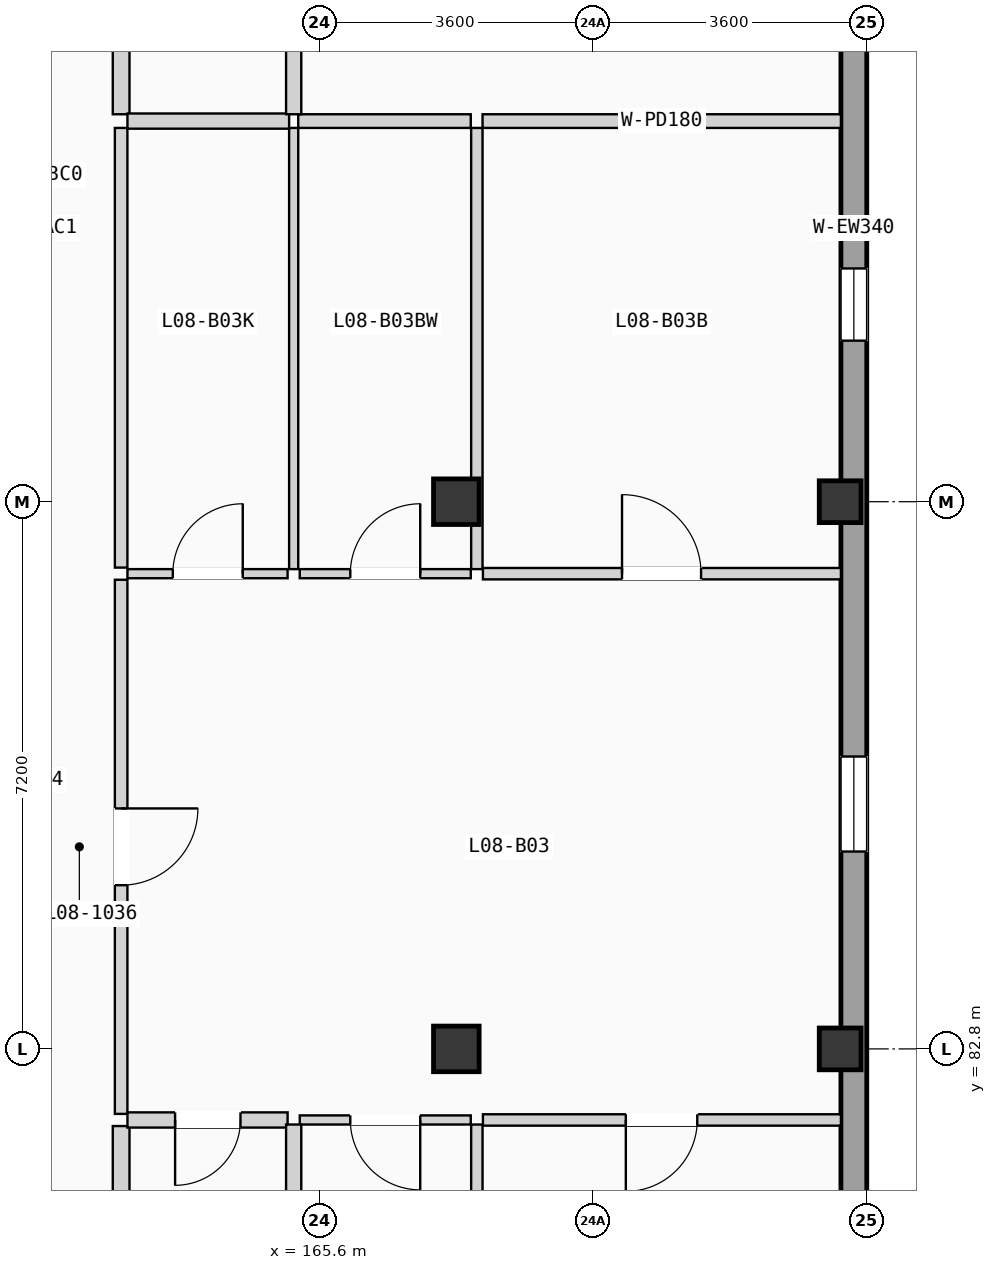
"""IFC4 building model, lengths in metres.
Left out: names, types, materials, properties, quantities, classifications, styles, units other than length and angle.
Written with IfcOpenShell. Run it as: python <this file> out.ifc"""

import sys

from ifc_helpers import new_model, si_unit, direction, frame, frame_2d, origin, origin_2d, place, context, subcontext, project, spatial, rectangle, extrude, element, fill, save


model = new_model("IFC4")
c1 = context("Model", 3, precision=1e-05, world=origin(), true_north=direction((0.0, 1.0)))
c2 = subcontext(c1, "Body", "Model", "MODEL_VIEW")
j1 = project(units=[si_unit("LENGTHUNIT", "METRE"), si_unit("PLANEANGLEUNIT", "RADIAN")], contexts=[c1])
p1 = place(None, origin())
s1 = spatial("IfcSite", under=j1, at=p1, CompositionType="ELEMENT")
p2 = place(p1, origin())
s2 = spatial("IfcBuilding", under=s1, at=p2, CompositionType="ELEMENT")
p3 = place(p2, frame((0.0, 0.0, 27.825)))
s3 = spatial("IfcBuildingStorey", under=s2, at=p3, CompositionType="ELEMENT", Elevation=27.825)
for number, where, z_axis, x_axis in (
    (1, (167.4, 82.8, 0.0), (0.0, 0.0, 1.0), (1.0, 0.0, 0.0)),
    (2, (167.4, 90.0, 0.0), (0.0, 0.0, 1.0), (1.0, 0.0, 0.0)),
):
    element("IfcColumn", number, at=place(p3, frame(where, z_axis=z_axis, x_axis=x_axis)), inside=s3, PredefinedType="COLUMN", context=c2, shape_type="SweptSolid", body=[
        extrude(rectangle(XDim=0.6, YDim=0.6, at=origin_2d()), origin(), (0.0, 0.0, 1.0), 3.15),
    ])
for number, where, z_axis, x_axis in (
    (3, (172.45, 82.8, 0.0), (0.0, 0.0, 1.0), (1.0, 0.0, 0.0)),
    (4, (172.45, 90.0, 0.0), (0.0, 0.0, 1.0), (1.0, 0.0, 0.0)),
):
    element("IfcColumn", number, at=place(p3, frame(where, z_axis=z_axis, x_axis=x_axis)), inside=s3, PredefinedType="COLUMN", context=c2, shape_type="SweptSolid", body=[
        extrude(rectangle(XDim=0.55, YDim=0.55, at=origin_2d()), origin(), (0.0, 0.0, 1.0), 3.15),
    ])
p4 = place(p3, frame((172.63, 68.74, 0.0), z_axis=(0.0, 0.0, 1.0), x_axis=(0.0, 1.0, 0.0)))
e5 = element("IfcWall", 5, at=p4, inside=s3, PredefinedType="SOLIDWALL", context=c2, shape_type="SweptSolid", body=[
    extrude(rectangle(XDim=49.72, YDim=0.34, at=frame_2d((24.86, 0.0))), origin(), (0.0, 0.0, 1.0), 2.89),
])
p5 = place(p4, frame((16.657, 0.0, 0.705)))
e6 = element("IfcOpeningElement", 6, at=p5, cuts=e5, PredefinedType="OPENING", context=c2, shape_type="SweptSolid", body=[
    extrude(rectangle(XDim=1.25, YDim=1.5, at=frame_2d((0.625, 0.75))), frame((0.0, 0.18, 0.0), z_axis=(0.0, -1.0, 0.0), x_axis=(1.0, 0.0, 0.0)), (0.0, 0.0, 1.0), 0.36),
])
p6 = place(p4, frame((9.528, 0.0, 0.555)))
e7 = element("IfcOpeningElement", 7, at=p6, cuts=e5, PredefinedType="OPENING", context=c2, shape_type="SweptSolid", body=[
    extrude(rectangle(XDim=1.25, YDim=1.65, at=frame_2d((0.625, 0.825))), frame((0.0, 0.18, 0.0), z_axis=(0.0, -1.0, 0.0), x_axis=(1.0, 0.0, 0.0)), (0.0, 0.0, 1.0), 0.36),
])
p7 = place(p4, frame((23.379, 0.0, 0.85)))
e8 = element("IfcOpeningElement", 8, at=p7, cuts=e5, PredefinedType="OPENING", context=c2, shape_type="SweptSolid", body=[
    extrude(rectangle(XDim=0.95, YDim=1.2, at=frame_2d((0.475, 0.6))), frame((0.0, 0.18, 0.0), z_axis=(0.0, -1.0, 0.0), x_axis=(1.0, 0.0, 0.0)), (0.0, 0.0, 1.0), 0.36),
])
p8 = place(p4, frame((32.735, 0.0, 0.9)))
e9 = element("IfcOpeningElement", 9, at=p8, cuts=e5, PredefinedType="OPENING", context=c2, shape_type="SweptSolid", body=[
    extrude(rectangle(XDim=1.35, YDim=1.2, at=frame_2d((0.675, 0.6))), frame((0.0, 0.18, 0.0), z_axis=(0.0, -1.0, 0.0), x_axis=(1.0, 0.0, 0.0)), (0.0, 0.0, 1.0), 0.36),
])
p9 = place(p4, frame((29.325, 0.0, 0.855)))
e10 = element("IfcOpeningElement", 10, at=p9, cuts=e5, PredefinedType="OPENING", context=c2, shape_type="SweptSolid", body=[
    extrude(rectangle(XDim=1.35, YDim=1.35, at=frame_2d((0.675, 0.675))), frame((0.0, 0.18, 0.0), z_axis=(0.0, -1.0, 0.0), x_axis=(1.0, 0.0, 0.0)), (0.0, 0.0, 1.0), 0.36),
])
p10 = place(p4, frame((39.329, 0.0, 0.705)))
e11 = element("IfcOpeningElement", 11, at=p10, cuts=e5, PredefinedType="OPENING", context=c2, shape_type="SweptSolid", body=[
    extrude(rectangle(XDim=1.35, YDim=1.5, at=frame_2d((0.675, 0.75))), frame((0.0, 0.18, 0.0), z_axis=(0.0, -1.0, 0.0), x_axis=(1.0, 0.0, 0.0)), (0.0, 0.0, 1.0), 0.36),
])
p11 = place(p3, frame((162.99, 81.945, 0.0), z_axis=(0.0, 0.0, 1.0), x_axis=(0.0, 1.0, 0.0)))
e12 = element("IfcWall", 12, at=p11, inside=s3, PredefinedType="PARTITIONING", context=c2, shape_type="SweptSolid", body=[
    extrude(rectangle(XDim=7.028, YDim=0.165, at=frame_2d((3.514, 0.0))), origin(), (0.0, 0.0, 1.0), 2.87),
])
p12 = place(p11, frame((3.009, 0.0, 0.0)))
e13 = element("IfcOpeningElement", 13, at=p12, cuts=e12, PredefinedType="OPENING", context=c2, shape_type="SweptSolid", body=[
    extrude(rectangle(XDim=1.01, YDim=2.11, at=frame_2d((0.505, 1.055))), frame((0.0, 0.093, 0.0), z_axis=(0.0, -1.0, 0.0), x_axis=(1.0, 0.0, 0.0)), (0.0, 0.0, 1.0), 0.185),
])
p13 = place(p3, frame((162.99, 75.975, 0.0), z_axis=(0.0, 0.0, 1.0), x_axis=(0.0, 1.0, 0.0)))
e14 = element("IfcWall", 14, at=p13, inside=s3, PredefinedType="PLUMBINGWALL", context=c2, shape_type="SweptSolid", body=[
    extrude(rectangle(XDim=5.81, YDim=0.22, at=frame_2d((2.905, 0.0))), origin(), (0.0, 0.0, 1.0), 2.87),
])
p14 = place(p3, frame((162.99, 89.133, 0.0), z_axis=(0.0, 0.0, 1.0), x_axis=(0.0, 1.0, 0.0)))
e15 = element("IfcWall", 15, at=p14, inside=s3, PredefinedType="PARTITIONING", context=c2, shape_type="SweptSolid", body=[
    extrude(rectangle(XDim=5.785, YDim=0.165, at=frame_2d((2.893, 0.0))), origin(), (0.0, 0.0, 1.0), 2.87),
])
p15 = place(p3, frame((162.99, 95.098, 0.0), z_axis=(0.0, 0.0, 1.0), x_axis=(0.0, 1.0, 0.0)))
e16 = element("IfcWall", 16, at=p15, inside=s3, PredefinedType="PLUMBINGWALL", context=c2, shape_type="SweptSolid", body=[
    extrude(rectangle(XDim=4.912, YDim=0.22, at=frame_2d((2.456, 0.0))), origin(), (0.0, 0.0, 1.0), 2.87),
])
p16 = place(p3, frame((163.073, 81.865, 0.0), z_axis=(0.0, 0.0, 1.0), x_axis=(1.0, 0.0, 0.0)))
e17 = element("IfcWall", 17, at=p16, inside=s3, PredefinedType="PLUMBINGWALL", context=c2, shape_type="SweptSolid", body=[
    extrude(rectangle(XDim=2.107, YDim=0.2, at=frame_2d((1.053, 0.0))), origin(), (0.0, 0.0, 1.0), 2.87),
])
p17 = place(p16, frame((0.627, 0.0, 0.0)))
e18 = element("IfcOpeningElement", 18, at=p17, cuts=e17, PredefinedType="OPENING", context=c2, shape_type="SweptSolid", body=[
    extrude(rectangle(XDim=0.86, YDim=2.0, at=frame_2d((0.43, 1.0))), frame((0.0, 0.11, 0.0), z_axis=(0.0, -1.0, 0.0), x_axis=(1.0, 0.0, 0.0)), (0.0, 0.0, 1.0), 0.22),
])
p18 = place(p3, frame((163.073, 89.053, 0.0), z_axis=(0.0, 0.0, 1.0), x_axis=(1.0, 0.0, 0.0)))
e19 = element("IfcWall", 19, at=p18, inside=s3, PredefinedType="PARTITIONING", context=c2, shape_type="SweptSolid", body=[
    extrude(rectangle(XDim=2.107, YDim=0.12, at=frame_2d((1.053, 0.0))), origin(), (0.0, 0.0, 1.0), 2.87),
])
p19 = place(p18, frame((0.597, 0.0, 0.0)))
e20 = element("IfcOpeningElement", 20, at=p19, cuts=e19, PredefinedType="OPENING", context=c2, shape_type="SweptSolid", body=[
    extrude(rectangle(XDim=0.92, YDim=2.02, at=frame_2d((0.46, 1.01))), frame((0.0, 0.07, 0.0), z_axis=(0.0, -1.0, 0.0), x_axis=(1.0, 0.0, 0.0)), (0.0, 0.0, 1.0), 0.14),
])
p20 = place(p3, frame((167.75, 81.865, 0.0), z_axis=(0.0, 0.0, 1.0), x_axis=(1.0, 0.0, 0.0)))
e21 = element("IfcWall", 21, at=p20, inside=s3, PredefinedType="PARTITIONING", context=c2, shape_type="SweptSolid", body=[
    extrude(rectangle(XDim=4.71, YDim=0.15, at=frame_2d((2.355, 0.0))), origin(), (0.0, 0.0, 1.0), 2.87),
])
p21 = place(p20, frame((1.88, 0.0, 0.0)))
e22 = element("IfcOpeningElement", 22, at=p21, cuts=e21, PredefinedType="OPENING", context=c2, shape_type="SweptSolid", body=[
    extrude(rectangle(XDim=0.94, YDim=2.06, at=frame_2d((0.47, 1.03))), frame((0.0, 0.085, 0.0), z_axis=(0.0, -1.0, 0.0), x_axis=(1.0, 0.0, 0.0)), (0.0, 0.0, 1.0), 0.17),
])
p22 = place(p3, frame((165.34, 81.865, 0.0), z_axis=(0.0, 0.0, 1.0), x_axis=(1.0, 0.0, 0.0)))
e23 = element("IfcWall", 23, at=p22, inside=s3, PredefinedType="PARTITIONING", context=c2, shape_type="SweptSolid", body=[
    extrude(rectangle(XDim=2.25, YDim=0.12, at=frame_2d((1.125, 0.0))), origin(), (0.0, 0.0, 1.0), 2.87),
])
p23 = place(p22, frame((0.665, 0.0, 0.0)))
e24 = element("IfcOpeningElement", 24, at=p23, cuts=e23, PredefinedType="OPENING", context=c2, shape_type="SweptSolid", body=[
    extrude(rectangle(XDim=0.92, YDim=2.02, at=frame_2d((0.46, 1.01))), frame((0.0, 0.07, 0.0), z_axis=(0.0, -1.0, 0.0), x_axis=(1.0, 0.0, 0.0)), (0.0, 0.0, 1.0), 0.14),
])
p24 = place(p3, frame((167.75, 89.053, 0.0), z_axis=(0.0, 0.0, 1.0), x_axis=(1.0, 0.0, 0.0)))
e25 = element("IfcWall", 25, at=p24, inside=s3, PredefinedType="PARTITIONING", context=c2, shape_type="SweptSolid", body=[
    extrude(rectangle(XDim=4.71, YDim=0.15, at=frame_2d((2.355, 0.0))), origin(), (0.0, 0.0, 1.0), 2.87),
])
p25 = place(p24, frame((1.83, 0.0, 0.0)))
e26 = element("IfcOpeningElement", 26, at=p25, cuts=e25, PredefinedType="OPENING", context=c2, shape_type="SweptSolid", body=[
    extrude(rectangle(XDim=1.04, YDim=2.08, at=frame_2d((0.52, 1.04))), frame((0.0, 0.085, 0.0), z_axis=(0.0, -1.0, 0.0), x_axis=(1.0, 0.0, 0.0)), (0.0, 0.0, 1.0), 0.17),
])
p26 = place(p3, frame((165.34, 89.053, 0.0), z_axis=(0.0, 0.0, 1.0), x_axis=(1.0, 0.0, 0.0)))
e27 = element("IfcWall", 27, at=p26, inside=s3, PredefinedType="PARTITIONING", context=c2, shape_type="SweptSolid", body=[
    extrude(rectangle(XDim=2.25, YDim=0.12, at=frame_2d((1.125, 0.0))), origin(), (0.0, 0.0, 1.0), 2.87),
])
p27 = place(p26, frame((0.665, 0.0, 0.0)))
e28 = element("IfcOpeningElement", 28, at=p27, cuts=e27, PredefinedType="OPENING", context=c2, shape_type="SweptSolid", body=[
    extrude(rectangle(XDim=0.92, YDim=2.02, at=frame_2d((0.46, 1.01))), frame((0.0, 0.07, 0.0), z_axis=(0.0, -1.0, 0.0), x_axis=(1.0, 0.0, 0.0)), (0.0, 0.0, 1.0), 0.14),
])
p28 = place(p3, frame((165.26, 75.975, 0.0), z_axis=(0.0, 0.0, 1.0), x_axis=(0.0, 1.0, 0.0)))
e29 = element("IfcWall", 29, at=p28, inside=s3, PredefinedType="PLUMBINGWALL", context=c2, shape_type="SweptSolid", body=[
    extrude(rectangle(XDim=5.83, YDim=0.2, at=frame_2d((2.915, 0.0))), origin(), (0.0, 0.0, 1.0), 2.87),
])
p29 = place(p28, frame((2.493, 0.0, 0.0)))
e30 = element("IfcOpeningElement", 30, at=p29, cuts=e29, PredefinedType="OPENING", context=c2, shape_type="SweptSolid", body=[
    extrude(rectangle(XDim=0.85, YDim=2.01, at=frame_2d((0.425, 1.005))), frame((0.0, 0.11, 0.0), z_axis=(0.0, -1.0, 0.0), x_axis=(1.0, 0.0, 0.0)), (0.0, 0.0, 1.0), 0.22),
])
p30 = place(p3, frame((165.26, 89.113, 0.0), z_axis=(0.0, 0.0, 1.0), x_axis=(0.0, 1.0, 0.0)))
e31 = element("IfcWall", 31, at=p30, inside=s3, PredefinedType="PARTITIONING", context=c2, shape_type="SweptSolid", body=[
    extrude(rectangle(XDim=5.805, YDim=0.12, at=frame_2d((2.902, 0.0))), origin(), (0.0, 0.0, 1.0), 2.87),
])
p31 = place(p3, frame((163.073, 95.008, 0.0), z_axis=(0.0, 0.0, 1.0), x_axis=(1.0, 0.0, 0.0)))
e32 = element("IfcWall", 32, at=p31, inside=s3, PredefinedType="PLUMBINGWALL", context=c2, shape_type="SweptSolid", body=[
    extrude(rectangle(XDim=2.127, YDim=0.2, at=frame_2d((1.063, 0.0))), origin(), (0.0, 0.0, 1.0), 2.87),
])
for number, where, z_axis, x_axis in (
    (33, (167.67, 76.0, 0.0), (0.0, 0.0, 1.0), (0.0, 1.0, 0.0)),
    (34, (167.67, 89.113, 0.0), (0.0, 0.0, 1.0), (0.0, 1.0, 0.0)),
):
    element("IfcWall", number, at=place(p3, frame(where, z_axis=z_axis, x_axis=x_axis)), inside=s3, PredefinedType="PARTITIONING", context=c2, shape_type="SweptSolid", body=[
        extrude(rectangle(XDim=5.805, YDim=0.15, at=frame_2d((2.902, 0.0))), origin(), (0.0, 0.0, 1.0), 2.87),
    ])
p32 = place(p3, frame((167.745, 95.008, 0.0), z_axis=(0.0, 0.0, 1.0), x_axis=(1.0, 0.0, 0.0)))
e35 = element("IfcWall", 35, at=p32, inside=s3, PredefinedType="PARTITIONING", context=c2, shape_type="SweptSolid", body=[
    extrude(rectangle(XDim=4.715, YDim=0.18, at=frame_2d((2.357, 0.0))), origin(), (0.0, 0.0, 1.0), 2.87),
])
p33 = place(p3, frame((165.32, 95.008, 0.0), z_axis=(0.0, 0.0, 1.0), x_axis=(1.0, 0.0, 0.0)))
e36 = element("IfcWall", 36, at=p33, inside=s3, PredefinedType="PARTITIONING", context=c2, shape_type="SweptSolid", body=[
    extrude(rectangle(XDim=2.27, YDim=0.18, at=frame_2d((1.135, 0.0))), origin(), (0.0, 0.0, 1.0), 2.87),
])
p34 = place(p3, frame((165.26, 95.098, 0.0), z_axis=(0.0, 0.0, 1.0), x_axis=(0.0, 1.0, 0.0)))
e37 = element("IfcWall", 37, at=p34, inside=s3, PredefinedType="PLUMBINGWALL", context=c2, shape_type="SweptSolid", body=[
    extrude(rectangle(XDim=4.912, YDim=0.2, at=frame_2d((2.456, 0.0))), origin(), (0.0, 0.0, 1.0), 2.87),
])
p35 = place(p5, origin())
e38 = element("IfcWindow", 38, at=p35, inside=s3, PartitioningType="SINGLE_PANEL", PredefinedType="WINDOW", context=c2, shape_type="SweptSolid", body=[
    extrude(rectangle(XDim=1.25, YDim=1.5, at=frame_2d((0.625, 0.75))), frame((0.0, 0.03, 0.0), z_axis=(0.0, -1.0, 0.0), x_axis=(1.0, 0.0, 0.0)), (0.0, 0.0, 1.0), 0.06),
])
fill(e6, e38)
p36 = place(p7, origin())
e39 = element("IfcWindow", 39, at=p36, inside=s3, PartitioningType="SINGLE_PANEL", PredefinedType="WINDOW", context=c2, shape_type="SweptSolid", body=[
    extrude(rectangle(XDim=0.95, YDim=1.2, at=frame_2d((0.475, 0.6))), frame((0.0, 0.03, 0.0), z_axis=(0.0, -1.0, 0.0), x_axis=(1.0, 0.0, 0.0)), (0.0, 0.0, 1.0), 0.06),
])
fill(e8, e39)
p37 = place(p12, frame((1.01, 0.0, 0.0), z_axis=(0.0, 0.0, 1.0), x_axis=(-1.0, 0.0, 0.0)))
e40 = element("IfcDoor", 40, at=p37, inside=s3, OperationType="SINGLE_SWING_RIGHT", PredefinedType="DOOR", context=c2, shape_type="SweptSolid", body=[
    extrude(rectangle(XDim=1.01, YDim=2.11, at=frame_2d((0.505, 1.055))), frame((0.0, 0.025, 0.0), z_axis=(0.0, -1.0, 0.0), x_axis=(1.0, 0.0, 0.0)), (0.0, 0.0, 1.0), 0.05),
])
fill(e13, e40)
p38 = place(p17, frame((0.86, 0.0, 0.0), z_axis=(0.0, 0.0, 1.0), x_axis=(-1.0, 0.0, 0.0)))
e41 = element("IfcDoor", 41, at=p38, inside=s3, OperationType="SINGLE_SWING_LEFT", PredefinedType="DOOR", context=c2, shape_type="SweptSolid", body=[
    extrude(rectangle(XDim=0.86, YDim=2.0, at=frame_2d((0.43, 1.0))), frame((0.0, 0.025, 0.0), z_axis=(0.0, -1.0, 0.0), x_axis=(1.0, 0.0, 0.0)), (0.0, 0.0, 1.0), 0.05),
])
fill(e18, e41)
p39 = place(p19, origin())
e42 = element("IfcDoor", 42, at=p39, inside=s3, OperationType="SINGLE_SWING_RIGHT", PredefinedType="DOOR", context=c2, shape_type="SweptSolid", body=[
    extrude(rectangle(XDim=0.92, YDim=2.02, at=frame_2d((0.46, 1.01))), frame((0.0, 0.025, 0.0), z_axis=(0.0, -1.0, 0.0), x_axis=(1.0, 0.0, 0.0)), (0.0, 0.0, 1.0), 0.05),
])
fill(e20, e42)
p40 = place(p21, frame((0.94, 0.0, 0.0), z_axis=(0.0, 0.0, 1.0), x_axis=(-1.0, 0.0, 0.0)))
e43 = element("IfcDoor", 43, at=p40, inside=s3, OperationType="SINGLE_SWING_LEFT", PredefinedType="DOOR", context=c2, shape_type="SweptSolid", body=[
    extrude(rectangle(XDim=0.94, YDim=2.06, at=frame_2d((0.47, 1.03))), frame((0.0, 0.025, 0.0), z_axis=(0.0, -1.0, 0.0), x_axis=(1.0, 0.0, 0.0)), (0.0, 0.0, 1.0), 0.05),
])
fill(e22, e43)
p41 = place(p23, frame((0.92, 0.0, 0.0), z_axis=(0.0, 0.0, 1.0), x_axis=(-1.0, 0.0, 0.0)))
e44 = element("IfcDoor", 44, at=p41, inside=s3, OperationType="SINGLE_SWING_RIGHT", PredefinedType="DOOR", context=c2, shape_type="SweptSolid", body=[
    extrude(rectangle(XDim=0.92, YDim=2.02, at=frame_2d((0.46, 1.01))), frame((0.0, 0.025, 0.0), z_axis=(0.0, -1.0, 0.0), x_axis=(1.0, 0.0, 0.0)), (0.0, 0.0, 1.0), 0.05),
])
fill(e24, e44)
p42 = place(p25, origin())
e45 = element("IfcDoor", 45, at=p42, inside=s3, OperationType="SINGLE_SWING_LEFT", PredefinedType="DOOR", context=c2, shape_type="SweptSolid", body=[
    extrude(rectangle(XDim=1.04, YDim=2.08, at=frame_2d((0.52, 1.04))), frame((0.0, 0.025, 0.0), z_axis=(0.0, -1.0, 0.0), x_axis=(1.0, 0.0, 0.0)), (0.0, 0.0, 1.0), 0.05),
])
fill(e26, e45)
p43 = place(p27, origin())
e46 = element("IfcDoor", 46, at=p43, inside=s3, OperationType="SINGLE_SWING_RIGHT", PredefinedType="DOOR", context=c2, shape_type="SweptSolid", body=[
    extrude(rectangle(XDim=0.92, YDim=2.02, at=frame_2d((0.46, 1.01))), frame((0.0, 0.025, 0.0), z_axis=(0.0, -1.0, 0.0), x_axis=(1.0, 0.0, 0.0)), (0.0, 0.0, 1.0), 0.05),
])
fill(e28, e46)
save(model, sys.argv[1])
